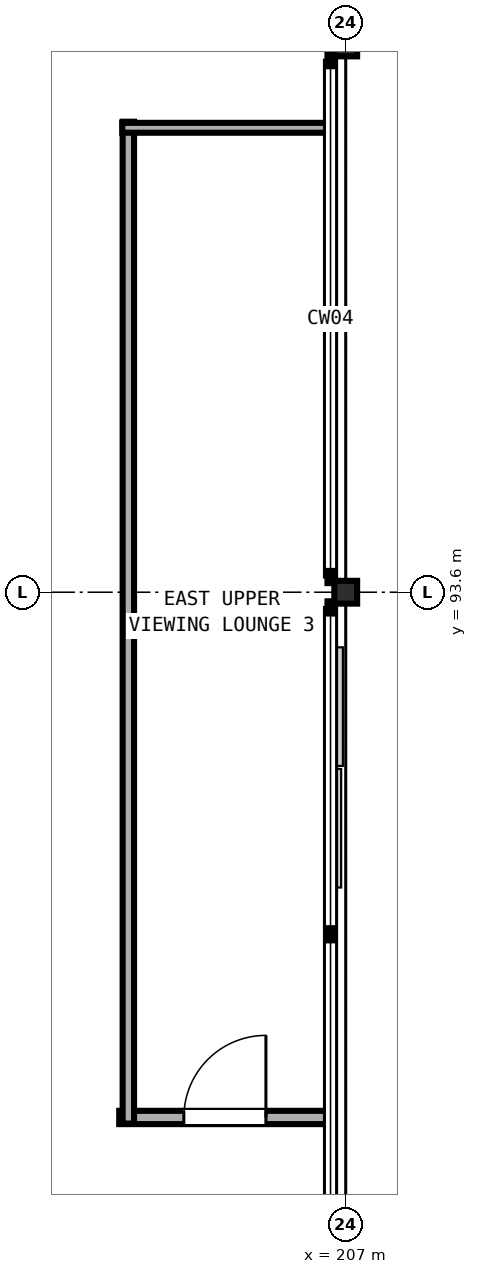
"""IFC4 building model, lengths in metres.
Left out: names, types, materials, properties, quantities, classifications, styles, units other than length and angle.
Written with IfcOpenShell. Run it as: python <this file> out.ifc"""

import sys

from ifc_helpers import new_model, si_unit, direction, frame, frame_2d, origin, origin_2d, place, context, subcontext, project, spatial, rectangle, hollow_rectangle, extrude, element, fill, save


model = new_model("IFC4")
c1 = context("Model", 3, precision=1e-05, world=origin(), true_north=direction((0.0, 1.0)))
c2 = subcontext(c1, "Body", "Model", "MODEL_VIEW")
j1 = project(units=[si_unit("LENGTHUNIT", "METRE"), si_unit("PLANEANGLEUNIT", "RADIAN")], contexts=[c1])
p1 = place(None, origin())
s1 = spatial("IfcSite", under=j1, at=p1, CompositionType="ELEMENT")
p2 = place(p1, origin())
s2 = spatial("IfcBuilding", under=s1, at=p2, CompositionType="ELEMENT")
p3 = place(p2, frame((0.0, 0.0, 19.2)))
s3 = spatial("IfcBuildingStorey", under=s2, at=p3, CompositionType="ELEMENT", Elevation=19.2)
for number, where, z_axis, x_axis in (
    (1, (207.0, 93.6, 0.0), (0.0, 0.0, 1.0), (1.0, 0.0, 0.0)),
    (2, (207.0, 100.8, 0.0), (0.0, 0.0, 1.0), (1.0, 0.0, 0.0)),
):
    element("IfcColumn", number, at=place(p3, frame(where, z_axis=z_axis, x_axis=x_axis)), inside=s3, PredefinedType="COLUMN", context=c2, shape_type="SweptSolid", body=[
        extrude(hollow_rectangle(XDim=0.3, YDim=0.3, WallThickness=0.012, at=origin_2d()), origin(), (0.0, 0.0, 1.0), 4.8),
    ])
p4 = place(p3, frame((204.02, 86.69, 0.0), z_axis=(0.0, 0.0, 1.0), x_axis=(1.0, 0.0, 0.0)))
e3 = element("IfcWall", 3, at=p4, inside=s3, PredefinedType="PARTITIONING", context=c2, shape_type="SweptSolid", body=[
    extrude(rectangle(XDim=2.78, YDim=0.175, at=frame_2d((1.39, 0.0))), origin(), (0.0, 0.0, 1.0), 3.28),
])
p5 = place(p4, frame((0.85, 0.0, 0.0)))
e4 = element("IfcOpeningElement", 4, at=p5, cuts=e3, PredefinedType="OPENING", context=c2, shape_type="SweptSolid", body=[
    extrude(rectangle(XDim=1.08, YDim=2.18, at=frame_2d((0.54, 1.09))), frame((0.0, 0.097, 0.0), z_axis=(0.0, -1.0, 0.0), x_axis=(1.0, 0.0, 0.0)), (0.0, 0.0, 1.0), 0.195),
])
p6 = place(p3, frame((204.14, 86.61, 0.0), z_axis=(0.0, 0.0, 1.0), x_axis=(0.0, 1.0, 0.0)))
e5 = element("IfcWall", 5, at=p6, inside=s3, PredefinedType="PARTITIONING", context=c2, shape_type="SweptSolid", body=[
    extrude(rectangle(XDim=13.18, YDim=0.15, at=frame_2d((6.59, 0.0))), origin(), (0.0, 0.0, 1.0), 3.28),
])
p7 = place(p3, frame((204.06, 99.71, 0.0), z_axis=(0.0, 0.0, 1.0), x_axis=(1.0, 0.0, 0.0)))
e6 = element("IfcWall", 6, at=p7, inside=s3, PredefinedType="PARTITIONING", context=c2, shape_type="SweptSolid", body=[
    extrude(rectangle(XDim=2.707, YDim=0.13, at=frame_2d((1.354, 0.0))), origin(), (0.0, 0.0, 1.0), 3.28),
])
p8 = place(p5, origin())
e7 = element("IfcDoor", 7, at=p8, inside=s3, OperationType="SINGLE_SWING_RIGHT", PredefinedType="DOOR", context=c2, shape_type="SweptSolid", body=[
    extrude(rectangle(XDim=1.08, YDim=2.18, at=frame_2d((0.54, 1.09))), frame((0.0, 0.025, 0.0), z_axis=(0.0, -1.0, 0.0), x_axis=(1.0, 0.0, 0.0)), (0.0, 0.0, 1.0), 0.05),
])
fill(e4, e7)
save(model, sys.argv[1])
